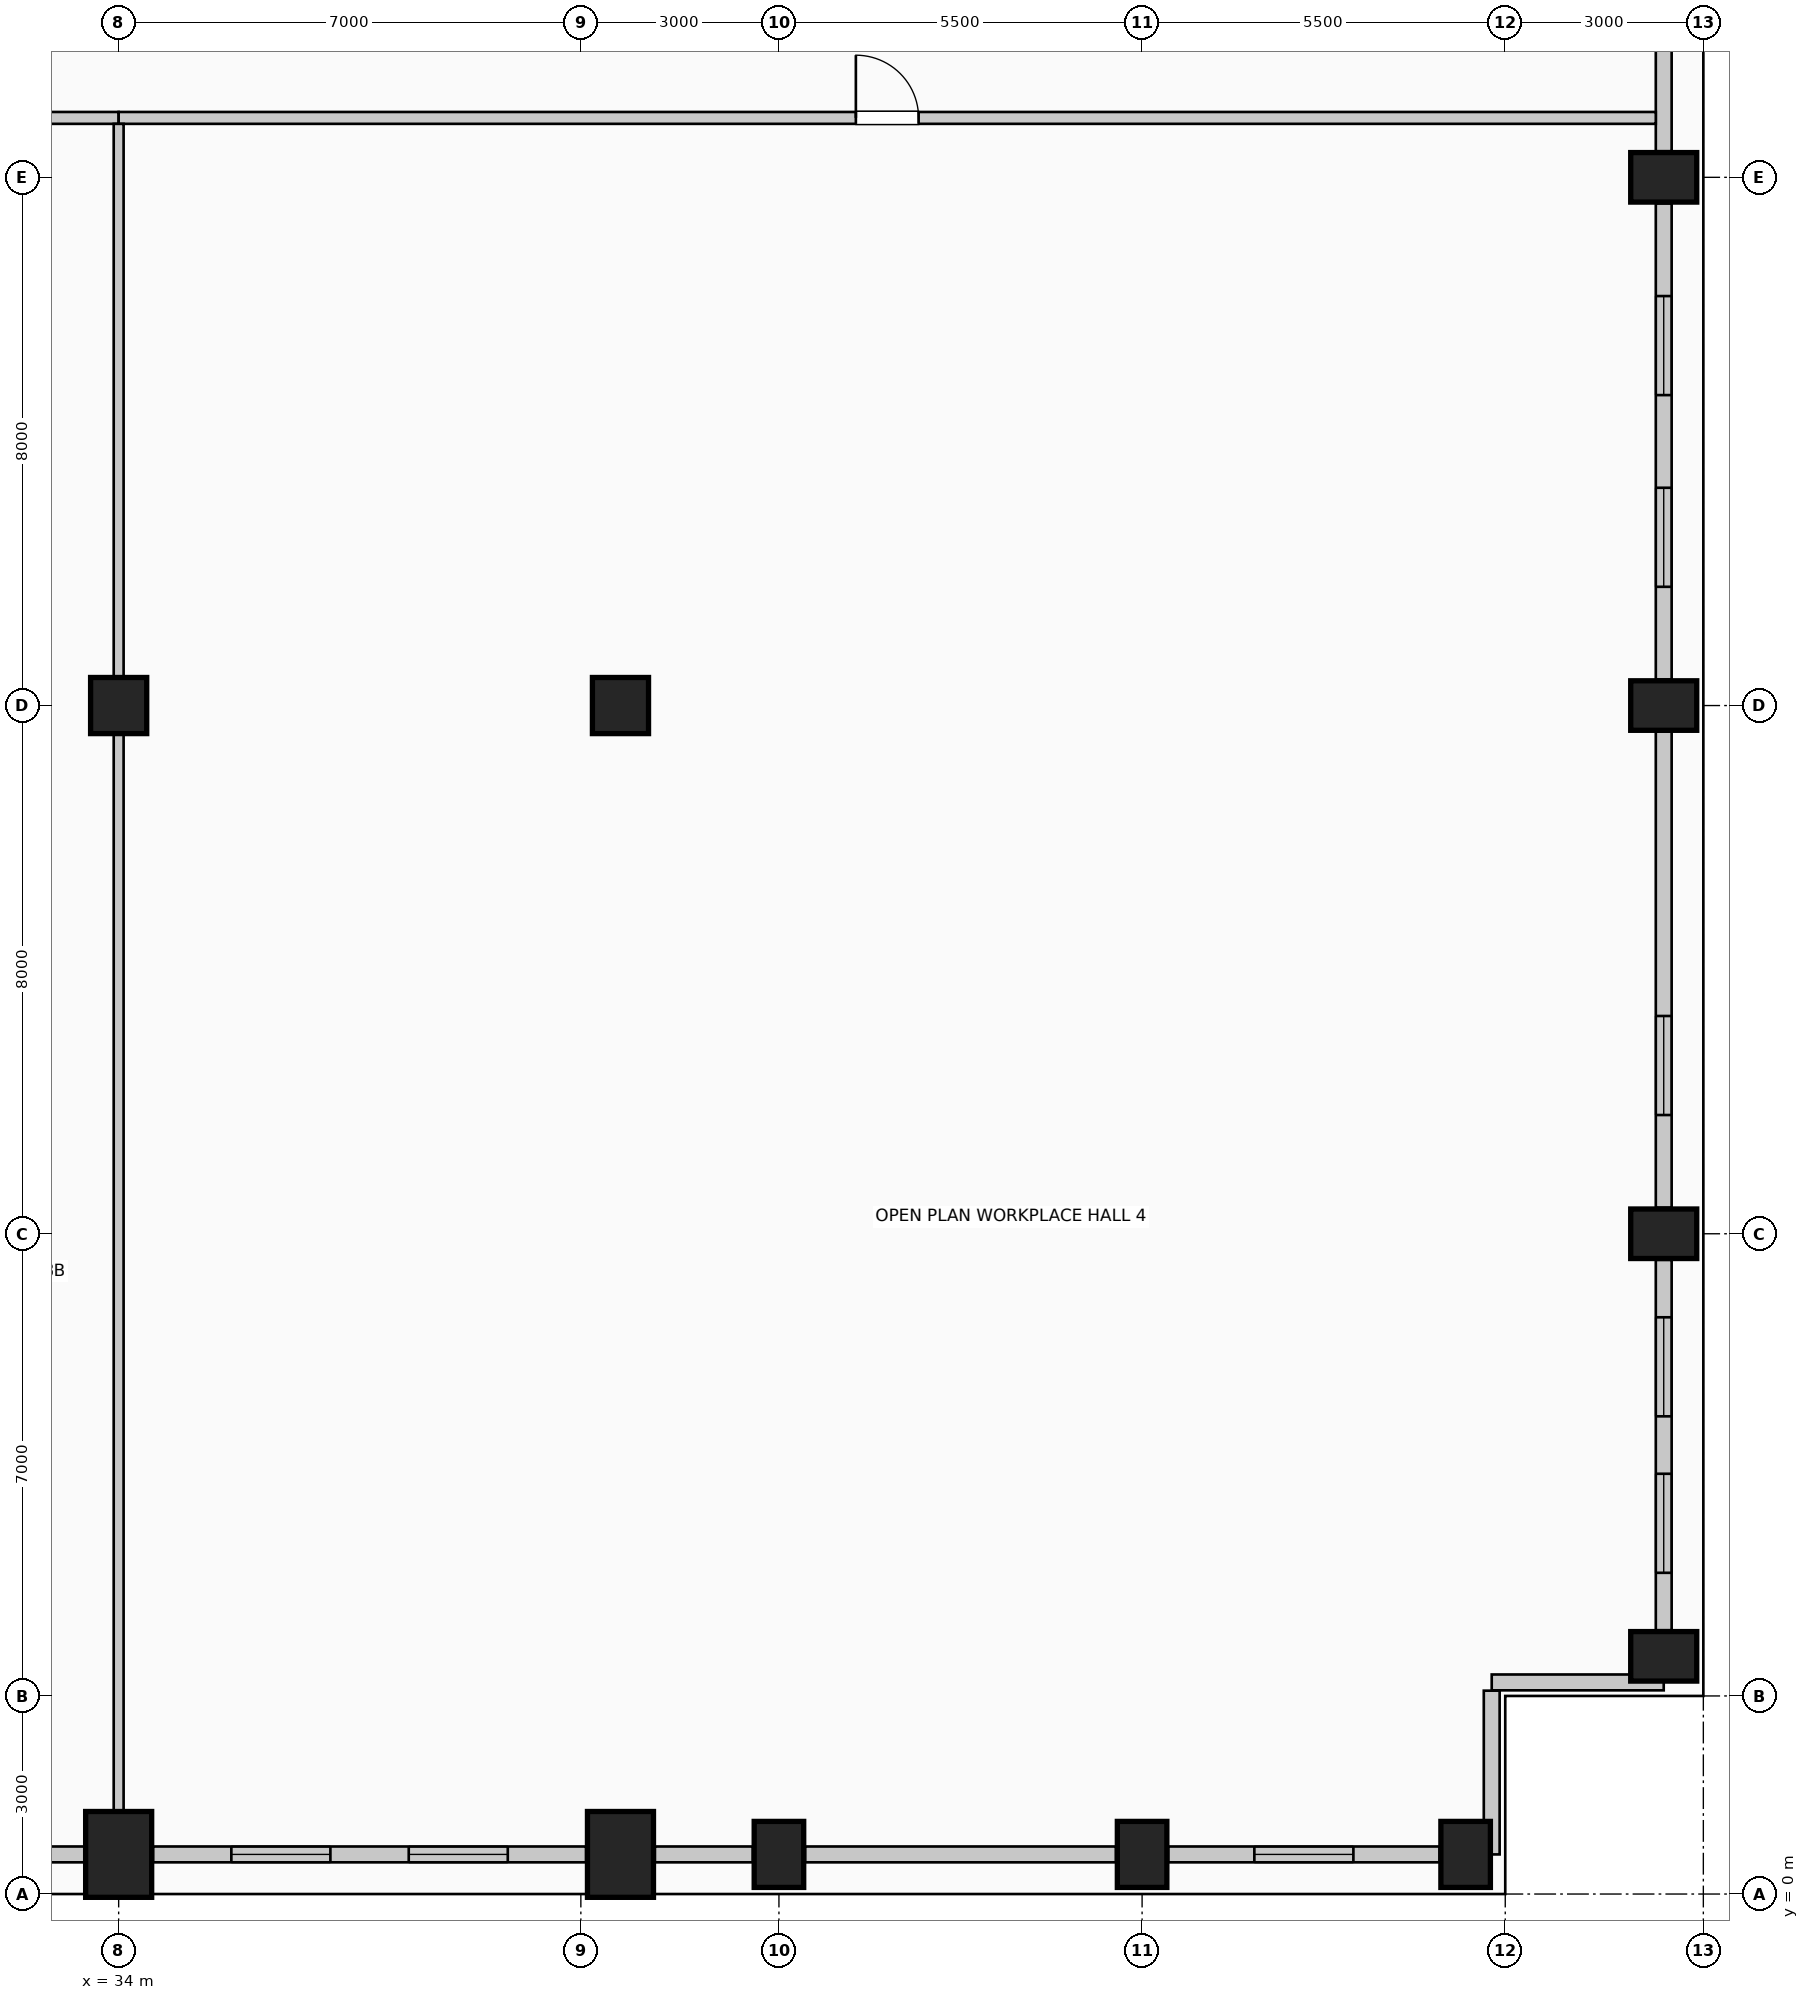
"""IFC4 building model, lengths in metres.
Left out: names, types, materials, properties, quantities, classifications, styles, units other than length and angle.
Written with IfcOpenShell. Run it as: python <this file> out.ifc"""

import sys

from ifc_helpers import new_model, si_unit, direction, frame, frame_2d, origin, origin_2d, place, context, subcontext, project, spatial, rectangle, circle, extrude, element, fill, save


model = new_model("IFC4")
c1 = context("Model", 3, precision=1e-05, world=origin(), true_north=direction((0.0, 1.0)))
c2 = subcontext(c1, "Body", "Model", "MODEL_VIEW")
j1 = project(units=[si_unit("LENGTHUNIT", "METRE"), si_unit("PLANEANGLEUNIT", "RADIAN")], contexts=[c1])
p1 = place(None, origin())
s1 = spatial("IfcSite", under=j1, at=p1, CompositionType="ELEMENT")
p2 = place(p1, origin())
s2 = spatial("IfcBuilding", under=s1, at=p2, CompositionType="ELEMENT")
p3 = place(p2, frame((0.0, 0.0, 234.6)))
s3 = spatial("IfcBuildingStorey", under=s2, at=p3, CompositionType="ELEMENT", Elevation=234.6)
for number, where, z_axis, x_axis in (
    (1, (34.0, 0.6, 0.0), (0.0, 0.0, 1.0), (1.0, 0.0, 0.0)),
    (2, (41.6, 0.6, 0.0), (0.0, 0.0, 1.0), (1.0, 0.0, 0.0)),
):
    element("IfcColumn", number, at=place(p3, frame(where, z_axis=z_axis, x_axis=x_axis)), inside=s3, PredefinedType="COLUMN", context=c2, shape_type="SweptSolid", body=[
        extrude(rectangle(XDim=1.0, YDim=1.3, at=origin_2d()), origin(), (0.0, 0.0, 1.0), 4.0),
    ])
for number, where, z_axis, x_axis in (
    (3, (44.0, 0.6, 0.0), (0.0, 0.0, 1.0), (1.0, 0.0, 0.0)),
    (4, (49.5, 0.6, 0.0), (0.0, 0.0, 1.0), (1.0, 0.0, 0.0)),
    (5, (54.4, 0.6, 0.0), (0.0, 0.0, 1.0), (1.0, 0.0, 0.0)),
    (6, (57.4, 3.6, 0.0), (0.0, 0.0, 1.0), (0.0, 1.0, 0.0)),
    (7, (57.4, 10.0, 0.0), (0.0, 0.0, 1.0), (0.0, 1.0, 0.0)),
    (8, (57.4, 18.0, 0.0), (0.0, 0.0, 1.0), (0.0, 1.0, 0.0)),
    (9, (57.4, 26.0, 0.0), (0.0, 0.0, 1.0), (0.0, 1.0, 0.0)),
):
    element("IfcColumn", number, at=place(p3, frame(where, z_axis=z_axis, x_axis=x_axis)), inside=s3, PredefinedType="COLUMN", context=c2, shape_type="SweptSolid", body=[
        extrude(rectangle(XDim=0.75, YDim=1.0, at=origin_2d()), origin(), (0.0, 0.0, 1.0), 4.0),
    ])
for number, where, z_axis, x_axis in (
    (10, (41.6, 18.0, 0.0), (0.0, 0.0, 1.0), (1.0, 0.0, 0.0)),
    (11, (34.0, 18.0, 0.0), (0.0, 0.0, 1.0), (1.0, 0.0, 0.0)),
):
    element("IfcColumn", number, at=place(p3, frame(where, z_axis=z_axis, x_axis=x_axis)), inside=s3, PredefinedType="COLUMN", context=c2, shape_type="SweptSolid", body=[
        extrude(circle(Radius=0.425, at=origin_2d()), origin(), (0.0, 0.0, 1.0), 4.0),
    ])
p4 = place(p3, frame((33.48, 0.6, 0.0), z_axis=(0.0, 0.0, 1.0), x_axis=(-1.0, 0.0, 0.0)))
e12 = element("IfcWall", 12, at=p4, inside=s3, PredefinedType="SOLIDWALL", context=c2, shape_type="SweptSolid", body=[
    extrude(rectangle(XDim=4.085, YDim=0.24, at=frame_2d((2.042, 0.0))), origin(), (0.0, 0.0, 1.0), 2.91),
])
p5 = place(p4, frame((1.292, 0.0, 0.42)))
e13 = element("IfcOpeningElement", 13, at=p5, cuts=e12, PredefinedType="OPENING", context=c2, shape_type="SweptSolid", body=[
    extrude(rectangle(XDim=1.5, YDim=2.2, at=frame_2d((0.75, 1.1))), frame((0.0, 0.13, 0.0), z_axis=(0.0, -1.0, 0.0), x_axis=(1.0, 0.0, 0.0)), (0.0, 0.0, 1.0), 0.26),
])
p6 = place(p3, frame((41.08, 0.6, 0.0), z_axis=(0.0, 0.0, 1.0), x_axis=(-1.0, 0.0, 0.0)))
e14 = element("IfcWall", 14, at=p6, inside=s3, PredefinedType="SOLIDWALL", context=c2, shape_type="SweptSolid", body=[
    extrude(rectangle(XDim=6.56, YDim=0.24, at=frame_2d((3.28, 0.0))), origin(), (0.0, 0.0, 1.0), 2.91),
])
p7 = place(p6, frame((1.187, 0.0, 0.42)))
e15 = element("IfcOpeningElement", 15, at=p7, cuts=e14, PredefinedType="OPENING", context=c2, shape_type="SweptSolid", body=[
    extrude(rectangle(XDim=1.5, YDim=2.2, at=frame_2d((0.75, 1.1))), frame((0.0, 0.13, 0.0), z_axis=(0.0, -1.0, 0.0), x_axis=(1.0, 0.0, 0.0)), (0.0, 0.0, 1.0), 0.26),
])
p8 = place(p6, frame((3.873, 0.0, 0.42)))
e16 = element("IfcOpeningElement", 16, at=p8, cuts=e14, PredefinedType="OPENING", context=c2, shape_type="SweptSolid", body=[
    extrude(rectangle(XDim=1.5, YDim=2.2, at=frame_2d((0.75, 1.1))), frame((0.0, 0.13, 0.0), z_axis=(0.0, -1.0, 0.0), x_axis=(1.0, 0.0, 0.0)), (0.0, 0.0, 1.0), 0.26),
])
p9 = place(p3, frame((43.605, 0.6, 0.0), z_axis=(0.0, 0.0, 1.0), x_axis=(-1.0, 0.0, 0.0)))
e17 = element("IfcWall", 17, at=p9, inside=s3, PredefinedType="SOLIDWALL", context=c2, shape_type="SweptSolid", body=[
    extrude(rectangle(XDim=1.485, YDim=0.24, at=frame_2d((0.742, 0.0))), origin(), (0.0, 0.0, 1.0), 2.91),
])
p10 = place(p3, frame((49.105, 0.6, 0.0), z_axis=(0.0, 0.0, 1.0), x_axis=(-1.0, 0.0, 0.0)))
e18 = element("IfcWall", 18, at=p10, inside=s3, PredefinedType="SOLIDWALL", context=c2, shape_type="SweptSolid", body=[
    extrude(rectangle(XDim=4.71, YDim=0.24, at=frame_2d((2.355, 0.0))), origin(), (0.0, 0.0, 1.0), 2.91),
])
p11 = place(p3, frame((54.005, 0.6, 0.0), z_axis=(0.0, 0.0, 1.0), x_axis=(-1.0, 0.0, 0.0)))
e19 = element("IfcWall", 19, at=p11, inside=s3, PredefinedType="SOLIDWALL", context=c2, shape_type="SweptSolid", body=[
    extrude(rectangle(XDim=4.11, YDim=0.24, at=frame_2d((2.055, 0.0))), origin(), (0.0, 0.0, 1.0), 2.91),
])
p12 = place(p11, frame((1.305, 0.0, 0.42)))
e20 = element("IfcOpeningElement", 20, at=p12, cuts=e19, PredefinedType="OPENING", context=c2, shape_type="SweptSolid", body=[
    extrude(rectangle(XDim=1.5, YDim=2.2, at=frame_2d((0.75, 1.1))), frame((0.0, 0.13, 0.0), z_axis=(0.0, -1.0, 0.0), x_axis=(1.0, 0.0, 0.0)), (0.0, 0.0, 1.0), 0.26),
])
p13 = place(p3, frame((57.4, 9.605, 0.0), z_axis=(0.0, 0.0, 1.0), x_axis=(0.0, -1.0, 0.0)))
e21 = element("IfcWall", 21, at=p13, inside=s3, PredefinedType="SOLIDWALL", context=c2, shape_type="SweptSolid", body=[
    extrude(rectangle(XDim=5.61, YDim=0.24, at=frame_2d((2.805, 0.0))), origin(), (0.0, 0.0, 1.0), 2.91),
])
p14 = place(p13, frame((0.87, 0.0, 0.42)))
e22 = element("IfcOpeningElement", 22, at=p14, cuts=e21, PredefinedType="OPENING", context=c2, shape_type="SweptSolid", body=[
    extrude(rectangle(XDim=1.5, YDim=2.2, at=frame_2d((0.75, 1.1))), frame((0.0, 0.13, 0.0), z_axis=(0.0, -1.0, 0.0), x_axis=(1.0, 0.0, 0.0)), (0.0, 0.0, 1.0), 0.26),
])
p15 = place(p13, frame((3.24, 0.0, 0.42)))
e23 = element("IfcOpeningElement", 23, at=p15, cuts=e21, PredefinedType="OPENING", context=c2, shape_type="SweptSolid", body=[
    extrude(rectangle(XDim=1.5, YDim=2.2, at=frame_2d((0.75, 1.1))), frame((0.0, 0.13, 0.0), z_axis=(0.0, -1.0, 0.0), x_axis=(1.0, 0.0, 0.0)), (0.0, 0.0, 1.0), 0.26),
])
p16 = place(p3, frame((57.4, 17.605, 0.0), z_axis=(0.0, 0.0, 1.0), x_axis=(0.0, -1.0, 0.0)))
e24 = element("IfcWall", 24, at=p16, inside=s3, PredefinedType="SOLIDWALL", context=c2, shape_type="SweptSolid", body=[
    extrude(rectangle(XDim=7.21, YDim=0.24, at=frame_2d((3.605, 0.0))), origin(), (0.0, 0.0, 1.0), 2.91),
])
p17 = place(p16, frame((4.307, 0.0, 0.42)))
e25 = element("IfcOpeningElement", 25, at=p17, cuts=e24, PredefinedType="OPENING", context=c2, shape_type="SweptSolid", body=[
    extrude(rectangle(XDim=1.5, YDim=2.2, at=frame_2d((0.75, 1.1))), frame((0.0, 0.13, 0.0), z_axis=(0.0, -1.0, 0.0), x_axis=(1.0, 0.0, 0.0)), (0.0, 0.0, 1.0), 0.26),
])
p18 = place(p3, frame((57.4, 25.605, 0.0), z_axis=(0.0, 0.0, 1.0), x_axis=(0.0, -1.0, 0.0)))
e26 = element("IfcWall", 26, at=p18, inside=s3, PredefinedType="SOLIDWALL", context=c2, shape_type="SweptSolid", body=[
    extrude(rectangle(XDim=7.21, YDim=0.24, at=frame_2d((3.605, 0.0))), origin(), (0.0, 0.0, 1.0), 2.91),
])
p19 = place(p18, frame((1.403, 0.0, 0.42)))
e27 = element("IfcOpeningElement", 27, at=p19, cuts=e26, PredefinedType="OPENING", context=c2, shape_type="SweptSolid", body=[
    extrude(rectangle(XDim=1.5, YDim=2.2, at=frame_2d((0.75, 1.1))), frame((0.0, 0.13, 0.0), z_axis=(0.0, -1.0, 0.0), x_axis=(1.0, 0.0, 0.0)), (0.0, 0.0, 1.0), 0.26),
])
p20 = place(p18, frame((4.307, 0.0, 0.42)))
e28 = element("IfcOpeningElement", 28, at=p20, cuts=e26, PredefinedType="OPENING", context=c2, shape_type="SweptSolid", body=[
    extrude(rectangle(XDim=1.5, YDim=2.2, at=frame_2d((0.75, 1.1))), frame((0.0, 0.13, 0.0), z_axis=(0.0, -1.0, 0.0), x_axis=(1.0, 0.0, 0.0)), (0.0, 0.0, 1.0), 0.26),
])
p21 = place(p3, frame((57.4, 33.605, 0.0), z_axis=(0.0, 0.0, 1.0), x_axis=(0.0, -1.0, 0.0)))
e29 = element("IfcWall", 29, at=p21, inside=s3, PredefinedType="SOLIDWALL", context=c2, shape_type="SweptSolid", body=[
    extrude(rectangle(XDim=7.21, YDim=0.24, at=frame_2d((3.605, 0.0))), origin(), (0.0, 0.0, 1.0), 2.91),
])
p22 = place(p3, frame((57.4, 3.205, 0.0), z_axis=(0.0, 0.0, 1.0), x_axis=(-1.0, 0.0, 0.0)))
e30 = element("IfcWall", 30, at=p22, inside=s3, PredefinedType="SOLIDWALL", context=c2, shape_type="SweptSolid", body=[
    extrude(rectangle(XDim=2.605, YDim=0.24, at=frame_2d((1.302, 0.0))), origin(), (0.0, 0.0, 1.0), 3.66),
])
p23 = place(p3, frame((54.795, 3.08, 0.0), z_axis=(0.0, 0.0, 1.0), x_axis=(0.0, -1.0, 0.0)))
e31 = element("IfcWall", 31, at=p23, inside=s3, PredefinedType="SOLIDWALL", context=c2, shape_type="SweptSolid", body=[
    extrude(rectangle(XDim=2.48, YDim=0.24, at=frame_2d((1.24, 0.0))), origin(), (0.0, 0.0, 1.0), 3.66),
])
p24 = place(p3, frame((28.77, 26.9, 0.0), z_axis=(0.0, 0.0, 1.0), x_axis=(1.0, 0.0, 0.0)))
e32 = element("IfcWall", 32, at=p24, inside=s3, PredefinedType="PARTITIONING", context=c2, shape_type="SweptSolid", body=[
    extrude(rectangle(XDim=5.23, YDim=0.18, at=frame_2d((2.615, 0.0))), origin(), (0.0, 0.0, 1.0), 3.66),
])
p25 = place(p24, frame((2.09, 0.0, 0.0)))
e33 = element("IfcOpeningElement", 33, at=p25, cuts=e32, PredefinedType="OPENING", context=c2, shape_type="SweptSolid", body=[
    extrude(rectangle(XDim=1.05, YDim=2.15, at=frame_2d((0.525, 1.075))), frame((0.0, 0.1, 0.0), z_axis=(0.0, -1.0, 0.0), x_axis=(1.0, 0.0, 0.0)), (0.0, 0.0, 1.0), 0.2),
])
p26 = place(p3, frame((34.0, 26.9, 0.0), z_axis=(0.0, 0.0, 1.0), x_axis=(1.0, 0.0, 0.0)))
e34 = element("IfcWall", 34, at=p26, inside=s3, PredefinedType="PARTITIONING", context=c2, shape_type="SweptSolid", body=[
    extrude(rectangle(XDim=23.28, YDim=0.18, at=frame_2d((11.64, 0.0))), origin(), (0.0, 0.0, 1.0), 3.66),
])
p27 = place(p26, frame((11.165, 0.0, 0.0)))
e35 = element("IfcOpeningElement", 35, at=p27, cuts=e34, PredefinedType="OPENING", context=c2, shape_type="SweptSolid", body=[
    extrude(rectangle(XDim=0.95, YDim=2.15, at=frame_2d((0.475, 1.075))), frame((0.0, 0.1, 0.0), z_axis=(0.0, -1.0, 0.0), x_axis=(1.0, 0.0, 0.0)), (0.0, 0.0, 1.0), 0.2),
])
p28 = place(p3, frame((34.0, 1.25, 0.0), z_axis=(0.0, 0.0, 1.0), x_axis=(0.0, 1.0, 0.0)))
e36 = element("IfcWall", 36, at=p28, inside=s3, PredefinedType="PARTITIONING", context=c2, shape_type="SweptSolid", body=[
    extrude(rectangle(XDim=16.325, YDim=0.15, at=frame_2d((8.163, 0.0))), origin(), (0.0, 0.0, 1.0), 3.055),
])
p29 = place(p3, frame((34.0, 18.425, 0.0), z_axis=(0.0, 0.0, 1.0), x_axis=(0.0, 1.0, 0.0)))
e37 = element("IfcWall", 37, at=p29, inside=s3, PredefinedType="PARTITIONING", context=c2, shape_type="SweptSolid", body=[
    extrude(rectangle(XDim=8.385, YDim=0.15, at=frame_2d((4.192, 0.0))), origin(), (0.0, 0.0, 1.0), 3.055),
])
p30 = place(p7, origin())
e38 = element("IfcWindow", 38, at=p30, inside=s3, PartitioningType="SINGLE_PANEL", PredefinedType="WINDOW", context=c2, shape_type="SweptSolid", body=[
    extrude(rectangle(XDim=1.5, YDim=2.2, at=frame_2d((0.75, 1.1))), frame((0.0, 0.03, 0.0), z_axis=(0.0, -1.0, 0.0), x_axis=(1.0, 0.0, 0.0)), (0.0, 0.0, 1.0), 0.06),
])
fill(e15, e38)
p31 = place(p8, origin())
e39 = element("IfcWindow", 39, at=p31, inside=s3, PartitioningType="SINGLE_PANEL", PredefinedType="WINDOW", context=c2, shape_type="SweptSolid", body=[
    extrude(rectangle(XDim=1.5, YDim=2.2, at=frame_2d((0.75, 1.1))), frame((0.0, 0.03, 0.0), z_axis=(0.0, -1.0, 0.0), x_axis=(1.0, 0.0, 0.0)), (0.0, 0.0, 1.0), 0.06),
])
fill(e16, e39)
p32 = place(p12, origin())
e40 = element("IfcWindow", 40, at=p32, inside=s3, PartitioningType="SINGLE_PANEL", PredefinedType="WINDOW", context=c2, shape_type="SweptSolid", body=[
    extrude(rectangle(XDim=1.5, YDim=2.2, at=frame_2d((0.75, 1.1))), frame((0.0, 0.03, 0.0), z_axis=(0.0, -1.0, 0.0), x_axis=(1.0, 0.0, 0.0)), (0.0, 0.0, 1.0), 0.06),
])
fill(e20, e40)
p33 = place(p14, origin())
e41 = element("IfcWindow", 41, at=p33, inside=s3, PartitioningType="SINGLE_PANEL", PredefinedType="WINDOW", context=c2, shape_type="SweptSolid", body=[
    extrude(rectangle(XDim=1.5, YDim=2.2, at=frame_2d((0.75, 1.1))), frame((0.0, 0.03, 0.0), z_axis=(0.0, -1.0, 0.0), x_axis=(1.0, 0.0, 0.0)), (0.0, 0.0, 1.0), 0.06),
])
fill(e22, e41)
p34 = place(p15, origin())
e42 = element("IfcWindow", 42, at=p34, inside=s3, PartitioningType="SINGLE_PANEL", PredefinedType="WINDOW", context=c2, shape_type="SweptSolid", body=[
    extrude(rectangle(XDim=1.5, YDim=2.2, at=frame_2d((0.75, 1.1))), frame((0.0, 0.03, 0.0), z_axis=(0.0, -1.0, 0.0), x_axis=(1.0, 0.0, 0.0)), (0.0, 0.0, 1.0), 0.06),
])
fill(e23, e42)
p35 = place(p17, origin())
e43 = element("IfcWindow", 43, at=p35, inside=s3, PartitioningType="SINGLE_PANEL", PredefinedType="WINDOW", context=c2, shape_type="SweptSolid", body=[
    extrude(rectangle(XDim=1.5, YDim=2.2, at=frame_2d((0.75, 1.1))), frame((0.0, 0.03, 0.0), z_axis=(0.0, -1.0, 0.0), x_axis=(1.0, 0.0, 0.0)), (0.0, 0.0, 1.0), 0.06),
])
fill(e25, e43)
p36 = place(p19, origin())
e44 = element("IfcWindow", 44, at=p36, inside=s3, PartitioningType="SINGLE_PANEL", PredefinedType="WINDOW", context=c2, shape_type="SweptSolid", body=[
    extrude(rectangle(XDim=1.5, YDim=2.2, at=frame_2d((0.75, 1.1))), frame((0.0, 0.03, 0.0), z_axis=(0.0, -1.0, 0.0), x_axis=(1.0, 0.0, 0.0)), (0.0, 0.0, 1.0), 0.06),
])
fill(e27, e44)
p37 = place(p20, origin())
e45 = element("IfcWindow", 45, at=p37, inside=s3, PartitioningType="SINGLE_PANEL", PredefinedType="WINDOW", context=c2, shape_type="SweptSolid", body=[
    extrude(rectangle(XDim=1.5, YDim=2.2, at=frame_2d((0.75, 1.1))), frame((0.0, 0.03, 0.0), z_axis=(0.0, -1.0, 0.0), x_axis=(1.0, 0.0, 0.0)), (0.0, 0.0, 1.0), 0.06),
])
fill(e28, e45)
p38 = place(p27, origin())
e46 = element("IfcDoor", 46, at=p38, inside=s3, OperationType="SINGLE_SWING_LEFT", PredefinedType="DOOR", context=c2, shape_type="SweptSolid", body=[
    extrude(rectangle(XDim=0.95, YDim=2.15, at=frame_2d((0.475, 1.075))), frame((0.0, 0.025, 0.0), z_axis=(0.0, -1.0, 0.0), x_axis=(1.0, 0.0, 0.0)), (0.0, 0.0, 1.0), 0.05),
])
fill(e35, e46)
save(model, sys.argv[1])
